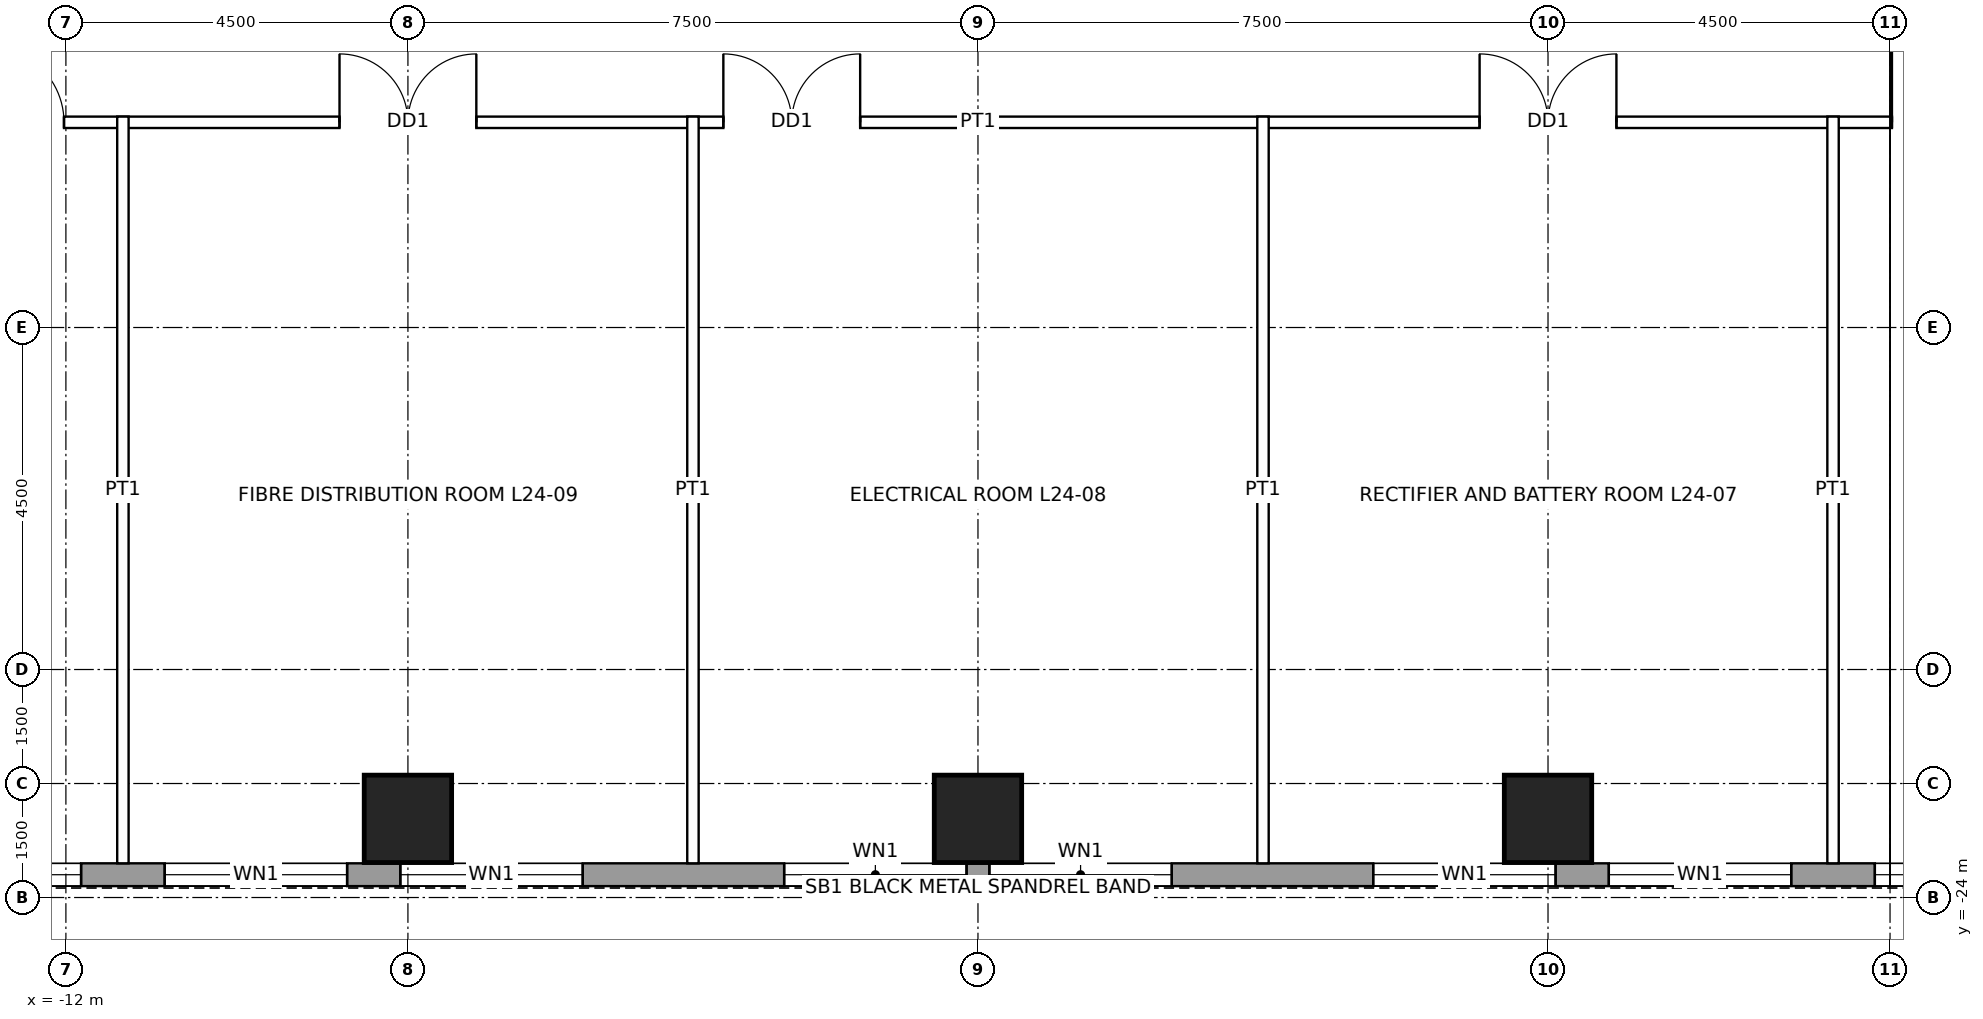
"""IFC4 building model, lengths in metres.
Left out: names, types, materials, properties, quantities, classifications, styles, units other than length and angle.
Written with IfcOpenShell. Run it as: python <this file> out.ifc"""

import sys

from ifc_helpers import new_model, si_unit, direction, frame, frame_2d, origin, origin_2d, place, context, subcontext, project, spatial, rectangle, hollow_rectangle, extrude, element, fill, save


model = new_model("IFC4")
c1 = context("Model", 3, precision=1e-05, world=origin(), true_north=direction((0.0, 1.0)))
c2 = subcontext(c1, "Body", "Model", "MODEL_VIEW")
j1 = project(units=[si_unit("LENGTHUNIT", "METRE"), si_unit("PLANEANGLEUNIT", "RADIAN")], contexts=[c1])
p1 = place(None, origin())
s1 = spatial("IfcSite", under=j1, at=p1, CompositionType="ELEMENT")
p2 = place(p1, origin())
s2 = spatial("IfcBuilding", under=s1, at=p2, CompositionType="ELEMENT")
p3 = place(p2, frame((0.0, 0.0, 122.4)))
s3 = spatial("IfcBuildingStorey", under=s2, at=p3, CompositionType="ELEMENT", Elevation=122.4)
for number, where, z_axis, x_axis in (
    (1, (7.5, -22.965, 0.0), (0.0, 0.0, 1.0), (1.0, 0.0, 0.0)),
    (2, (0.0, -22.965, 0.0), (0.0, 0.0, 1.0), (1.0, 0.0, 0.0)),
    (3, (-7.5, -22.965, 0.0), (0.0, 0.0, 1.0), (1.0, 0.0, 0.0)),
):
    element("IfcColumn", number, at=place(p3, frame(where, z_axis=z_axis, x_axis=x_axis)), inside=s3, PredefinedType="COLUMN", context=c2, shape_type="SweptSolid", body=[
        extrude(hollow_rectangle(XDim=1.15, YDim=1.15, WallThickness=0.075, at=origin_2d()), origin(), (0.0, 0.0, 1.0), 4.5),
    ])
p4 = place(p3, frame((16.2, -23.7, 0.0), z_axis=(0.0, 0.0, 1.0), x_axis=(-1.0, 0.0, 0.0)))
e4 = element("IfcWall", 4, at=p4, inside=s3, PredefinedType="SOLIDWALL", context=c2, shape_type="SweptSolid", body=[
    extrude(rectangle(XDim=32.4, YDim=0.3, at=frame_2d((16.2, 0.0))), origin(), (0.0, 0.0, 1.0), 4.3),
])
p5 = place(p4, frame((2.0, 0.0, 1.0)))
e5 = element("IfcOpeningElement", 5, at=p5, cuts=e4, PredefinedType="OPENING", context=c2, shape_type="SweptSolid", body=[
    extrude(rectangle(XDim=2.4, YDim=1.2, at=frame_2d((1.2, 0.6))), frame((0.0, 0.16, 0.0), z_axis=(0.0, -1.0, 0.0), x_axis=(1.0, 0.0, 0.0)), (0.0, 0.0, 1.0), 0.32),
])
p6 = place(p4, frame((5.5, 0.0, 1.0)))
e6 = element("IfcOpeningElement", 6, at=p6, cuts=e4, PredefinedType="OPENING", context=c2, shape_type="SweptSolid", body=[
    extrude(rectangle(XDim=2.4, YDim=1.2, at=frame_2d((1.2, 0.6))), frame((0.0, 0.16, 0.0), z_axis=(0.0, -1.0, 0.0), x_axis=(1.0, 0.0, 0.0)), (0.0, 0.0, 1.0), 0.32),
])
p7 = place(p4, frame((8.6, 0.0, 1.0)))
e7 = element("IfcOpeningElement", 7, at=p7, cuts=e4, PredefinedType="OPENING", context=c2, shape_type="SweptSolid", body=[
    extrude(rectangle(XDim=2.4, YDim=1.2, at=frame_2d((1.2, 0.6))), frame((0.0, 0.16, 0.0), z_axis=(0.0, -1.0, 0.0), x_axis=(1.0, 0.0, 0.0)), (0.0, 0.0, 1.0), 0.32),
])
p8 = place(p4, frame((13.65, 0.0, 1.0)))
e8 = element("IfcOpeningElement", 8, at=p8, cuts=e4, PredefinedType="OPENING", context=c2, shape_type="SweptSolid", body=[
    extrude(rectangle(XDim=2.4, YDim=1.2, at=frame_2d((1.2, 0.6))), frame((0.0, 0.16, 0.0), z_axis=(0.0, -1.0, 0.0), x_axis=(1.0, 0.0, 0.0)), (0.0, 0.0, 1.0), 0.32),
])
p9 = place(p4, frame((16.35, 0.0, 1.0)))
e9 = element("IfcOpeningElement", 9, at=p9, cuts=e4, PredefinedType="OPENING", context=c2, shape_type="SweptSolid", body=[
    extrude(rectangle(XDim=2.4, YDim=1.2, at=frame_2d((1.2, 0.6))), frame((0.0, 0.16, 0.0), z_axis=(0.0, -1.0, 0.0), x_axis=(1.0, 0.0, 0.0)), (0.0, 0.0, 1.0), 0.32),
])
p10 = place(p4, frame((21.4, 0.0, 1.0)))
e10 = element("IfcOpeningElement", 10, at=p10, cuts=e4, PredefinedType="OPENING", context=c2, shape_type="SweptSolid", body=[
    extrude(rectangle(XDim=2.4, YDim=1.2, at=frame_2d((1.2, 0.6))), frame((0.0, 0.16, 0.0), z_axis=(0.0, -1.0, 0.0), x_axis=(1.0, 0.0, 0.0)), (0.0, 0.0, 1.0), 0.32),
])
p11 = place(p4, frame((24.5, 0.0, 1.0)))
e11 = element("IfcOpeningElement", 11, at=p11, cuts=e4, PredefinedType="OPENING", context=c2, shape_type="SweptSolid", body=[
    extrude(rectangle(XDim=2.4, YDim=1.2, at=frame_2d((1.2, 0.6))), frame((0.0, 0.16, 0.0), z_axis=(0.0, -1.0, 0.0), x_axis=(1.0, 0.0, 0.0)), (0.0, 0.0, 1.0), 0.32),
])
p12 = place(p4, frame((28.0, 0.0, 1.0)))
e12 = element("IfcOpeningElement", 12, at=p12, cuts=e4, PredefinedType="OPENING", context=c2, shape_type="SweptSolid", body=[
    extrude(rectangle(XDim=2.4, YDim=1.2, at=frame_2d((1.2, 0.6))), frame((0.0, 0.16, 0.0), z_axis=(0.0, -1.0, 0.0), x_axis=(1.0, 0.0, 0.0)), (0.0, 0.0, 1.0), 0.32),
])
p13 = place(p3, frame((-13.875, -13.8, 0.0), z_axis=(0.0, 0.0, 1.0), x_axis=(1.0, 0.0, 0.0)))
e13 = element("IfcWall", 13, at=p13, inside=s3, PredefinedType="PARTITIONING", context=c2, shape_type="SweptSolid", body=[
    extrude(rectangle(XDim=27.75, YDim=0.15, at=frame_2d((13.875, 0.0))), origin(), (0.0, 0.0, 1.0), 4.3),
])
p14 = place(p13, frame((20.475, 0.0, 0.0)))
e14 = element("IfcOpeningElement", 14, at=p14, cuts=e13, PredefinedType="OPENING", context=c2, shape_type="SweptSolid", body=[
    extrude(rectangle(XDim=1.8, YDim=2.4, at=frame_2d((0.9, 1.2))), frame((0.0, 0.085, 0.0), z_axis=(0.0, -1.0, 0.0), x_axis=(1.0, 0.0, 0.0)), (0.0, 0.0, 1.0), 0.17),
])
p15 = place(p13, frame((10.525, 0.0, 0.0)))
e15 = element("IfcOpeningElement", 15, at=p15, cuts=e13, PredefinedType="OPENING", context=c2, shape_type="SweptSolid", body=[
    extrude(rectangle(XDim=1.8, YDim=2.4, at=frame_2d((0.9, 1.2))), frame((0.0, 0.085, 0.0), z_axis=(0.0, -1.0, 0.0), x_axis=(1.0, 0.0, 0.0)), (0.0, 0.0, 1.0), 0.17),
])
p16 = place(p13, frame((5.475, 0.0, 0.0)))
e16 = element("IfcOpeningElement", 16, at=p16, cuts=e13, PredefinedType="OPENING", context=c2, shape_type="SweptSolid", body=[
    extrude(rectangle(XDim=1.8, YDim=2.4, at=frame_2d((0.9, 1.2))), frame((0.0, 0.085, 0.0), z_axis=(0.0, -1.0, 0.0), x_axis=(1.0, 0.0, 0.0)), (0.0, 0.0, 1.0), 0.17),
])
p17 = place(p13, frame((25.9, 0.0, 0.0)))
e17 = element("IfcOpeningElement", 17, at=p17, cuts=e13, PredefinedType="OPENING", context=c2, shape_type="SweptSolid", body=[
    extrude(rectangle(XDim=1.0, YDim=2.1, at=frame_2d((0.5, 1.05))), frame((0.0, 0.085, 0.0), z_axis=(0.0, -1.0, 0.0), x_axis=(1.0, 0.0, 0.0)), (0.0, 0.0, 1.0), 0.17),
])
p18 = place(p13, frame((0.85, 0.0, 0.0)))
e18 = element("IfcOpeningElement", 18, at=p18, cuts=e13, PredefinedType="OPENING", context=c2, shape_type="SweptSolid", body=[
    extrude(rectangle(XDim=1.0, YDim=2.1, at=frame_2d((0.5, 1.05))), frame((0.0, 0.085, 0.0), z_axis=(0.0, -1.0, 0.0), x_axis=(1.0, 0.0, 0.0)), (0.0, 0.0, 1.0), 0.17),
])
for number, where, z_axis, x_axis in (
    (19, (-11.25, -23.55, 0.0), (0.0, 0.0, 1.0), (0.0, 1.0, 0.0)),
    (20, (-3.75, -23.55, 0.0), (0.0, 0.0, 1.0), (0.0, 1.0, 0.0)),
    (21, (3.75, -23.55, 0.0), (0.0, 0.0, 1.0), (0.0, 1.0, 0.0)),
    (22, (11.25, -23.55, 0.0), (0.0, 0.0, 1.0), (0.0, 1.0, 0.0)),
):
    element("IfcWall", number, at=place(p3, frame(where, z_axis=z_axis, x_axis=x_axis)), inside=s3, PredefinedType="PARTITIONING", context=c2, shape_type="SweptSolid", body=[
        extrude(rectangle(XDim=9.825, YDim=0.15, at=frame_2d((4.913, 0.0))), origin(), (0.0, 0.0, 1.0), 3.431),
    ])
p19 = place(p5, origin())
e23 = element("IfcWindow", 23, at=p19, inside=s3, PartitioningType="SINGLE_PANEL", PredefinedType="WINDOW", context=c2, shape_type="SweptSolid", body=[
    extrude(rectangle(XDim=2.4, YDim=1.2, at=frame_2d((1.2, 0.6))), frame((0.0, 0.03, 0.0), z_axis=(0.0, -1.0, 0.0), x_axis=(1.0, 0.0, 0.0)), (0.0, 0.0, 1.0), 0.06),
])
fill(e5, e23)
p20 = place(p6, origin())
e24 = element("IfcWindow", 24, at=p20, inside=s3, PartitioningType="SINGLE_PANEL", PredefinedType="WINDOW", context=c2, shape_type="SweptSolid", body=[
    extrude(rectangle(XDim=2.4, YDim=1.2, at=frame_2d((1.2, 0.6))), frame((0.0, 0.03, 0.0), z_axis=(0.0, -1.0, 0.0), x_axis=(1.0, 0.0, 0.0)), (0.0, 0.0, 1.0), 0.06),
])
fill(e6, e24)
p21 = place(p7, origin())
e25 = element("IfcWindow", 25, at=p21, inside=s3, PartitioningType="SINGLE_PANEL", PredefinedType="WINDOW", context=c2, shape_type="SweptSolid", body=[
    extrude(rectangle(XDim=2.4, YDim=1.2, at=frame_2d((1.2, 0.6))), frame((0.0, 0.03, 0.0), z_axis=(0.0, -1.0, 0.0), x_axis=(1.0, 0.0, 0.0)), (0.0, 0.0, 1.0), 0.06),
])
fill(e7, e25)
p22 = place(p8, origin())
e26 = element("IfcWindow", 26, at=p22, inside=s3, PartitioningType="SINGLE_PANEL", PredefinedType="WINDOW", context=c2, shape_type="SweptSolid", body=[
    extrude(rectangle(XDim=2.4, YDim=1.2, at=frame_2d((1.2, 0.6))), frame((0.0, 0.03, 0.0), z_axis=(0.0, -1.0, 0.0), x_axis=(1.0, 0.0, 0.0)), (0.0, 0.0, 1.0), 0.06),
])
fill(e8, e26)
p23 = place(p9, origin())
e27 = element("IfcWindow", 27, at=p23, inside=s3, PartitioningType="SINGLE_PANEL", PredefinedType="WINDOW", context=c2, shape_type="SweptSolid", body=[
    extrude(rectangle(XDim=2.4, YDim=1.2, at=frame_2d((1.2, 0.6))), frame((0.0, 0.03, 0.0), z_axis=(0.0, -1.0, 0.0), x_axis=(1.0, 0.0, 0.0)), (0.0, 0.0, 1.0), 0.06),
])
fill(e9, e27)
p24 = place(p10, origin())
e28 = element("IfcWindow", 28, at=p24, inside=s3, PartitioningType="SINGLE_PANEL", PredefinedType="WINDOW", context=c2, shape_type="SweptSolid", body=[
    extrude(rectangle(XDim=2.4, YDim=1.2, at=frame_2d((1.2, 0.6))), frame((0.0, 0.03, 0.0), z_axis=(0.0, -1.0, 0.0), x_axis=(1.0, 0.0, 0.0)), (0.0, 0.0, 1.0), 0.06),
])
fill(e10, e28)
p25 = place(p11, origin())
e29 = element("IfcWindow", 29, at=p25, inside=s3, PartitioningType="SINGLE_PANEL", PredefinedType="WINDOW", context=c2, shape_type="SweptSolid", body=[
    extrude(rectangle(XDim=2.4, YDim=1.2, at=frame_2d((1.2, 0.6))), frame((0.0, 0.03, 0.0), z_axis=(0.0, -1.0, 0.0), x_axis=(1.0, 0.0, 0.0)), (0.0, 0.0, 1.0), 0.06),
])
fill(e11, e29)
p26 = place(p12, origin())
e30 = element("IfcWindow", 30, at=p26, inside=s3, PartitioningType="SINGLE_PANEL", PredefinedType="WINDOW", context=c2, shape_type="SweptSolid", body=[
    extrude(rectangle(XDim=2.4, YDim=1.2, at=frame_2d((1.2, 0.6))), frame((0.0, 0.03, 0.0), z_axis=(0.0, -1.0, 0.0), x_axis=(1.0, 0.0, 0.0)), (0.0, 0.0, 1.0), 0.06),
])
fill(e12, e30)
p27 = place(p14, origin())
e31 = element("IfcDoor", 31, at=p27, inside=s3, OperationType="DOUBLE_DOOR_SINGLE_SWING", PredefinedType="DOOR", context=c2, shape_type="SweptSolid", body=[
    extrude(rectangle(XDim=1.8, YDim=2.4, at=frame_2d((0.9, 1.2))), frame((0.0, 0.025, 0.0), z_axis=(0.0, -1.0, 0.0), x_axis=(1.0, 0.0, 0.0)), (0.0, 0.0, 1.0), 0.05),
])
fill(e14, e31)
p28 = place(p15, origin())
e32 = element("IfcDoor", 32, at=p28, inside=s3, OperationType="DOUBLE_DOOR_SINGLE_SWING", PredefinedType="DOOR", context=c2, shape_type="SweptSolid", body=[
    extrude(rectangle(XDim=1.8, YDim=2.4, at=frame_2d((0.9, 1.2))), frame((0.0, 0.025, 0.0), z_axis=(0.0, -1.0, 0.0), x_axis=(1.0, 0.0, 0.0)), (0.0, 0.0, 1.0), 0.05),
])
fill(e15, e32)
p29 = place(p16, origin())
e33 = element("IfcDoor", 33, at=p29, inside=s3, OperationType="DOUBLE_DOOR_SINGLE_SWING", PredefinedType="DOOR", context=c2, shape_type="SweptSolid", body=[
    extrude(rectangle(XDim=1.8, YDim=2.4, at=frame_2d((0.9, 1.2))), frame((0.0, 0.025, 0.0), z_axis=(0.0, -1.0, 0.0), x_axis=(1.0, 0.0, 0.0)), (0.0, 0.0, 1.0), 0.05),
])
fill(e16, e33)
p30 = place(p17, origin())
e34 = element("IfcDoor", 34, at=p30, inside=s3, OperationType="SINGLE_SWING_LEFT", PredefinedType="DOOR", context=c2, shape_type="SweptSolid", body=[
    extrude(rectangle(XDim=1.0, YDim=2.1, at=frame_2d((0.5, 1.05))), frame((0.0, 0.025, 0.0), z_axis=(0.0, -1.0, 0.0), x_axis=(1.0, 0.0, 0.0)), (0.0, 0.0, 1.0), 0.05),
])
fill(e17, e34)
p31 = place(p18, origin())
e35 = element("IfcDoor", 35, at=p31, inside=s3, OperationType="SINGLE_SWING_LEFT", PredefinedType="DOOR", context=c2, shape_type="SweptSolid", body=[
    extrude(rectangle(XDim=1.0, YDim=2.1, at=frame_2d((0.5, 1.05))), frame((0.0, 0.025, 0.0), z_axis=(0.0, -1.0, 0.0), x_axis=(1.0, 0.0, 0.0)), (0.0, 0.0, 1.0), 0.05),
])
fill(e18, e35)
save(model, sys.argv[1])
